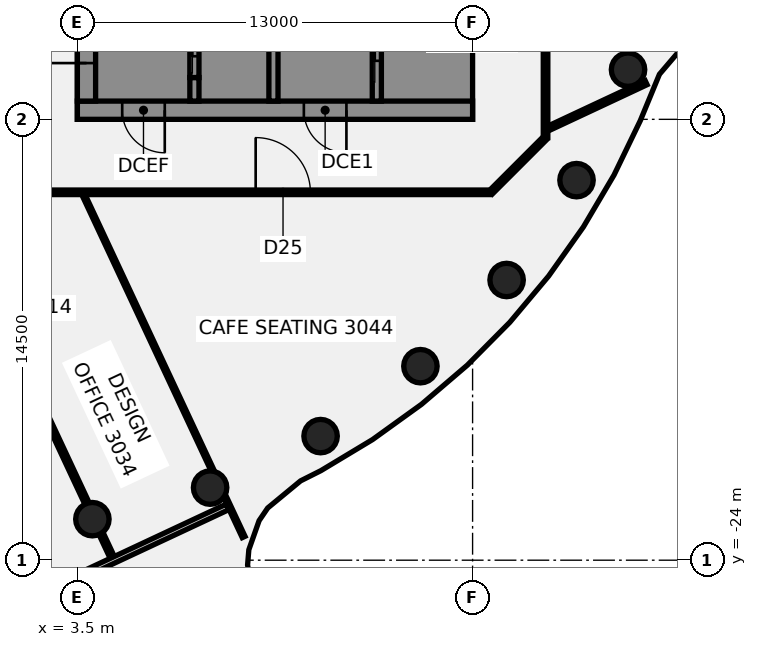
"""IFC4 building model, lengths in metres.
Left out: names, types, materials, properties, quantities, classifications, styles, units other than length and angle.
Written with IfcOpenShell. Run it as: python <this file> out.ifc"""

import sys

from ifc_helpers import new_model, si_unit, direction, frame, frame_2d, origin, origin_2d, place, context, subcontext, project, spatial, polyline, rectangle, circle, outline, extrude, element, fill, save


model = new_model("IFC4")
c1 = context("Model", 3, precision=1e-05, world=origin(), true_north=direction((0.0, 1.0)))
c2 = subcontext(c1, "Body", "Model", "MODEL_VIEW")
j1 = project(units=[si_unit("LENGTHUNIT", "METRE"), si_unit("PLANEANGLEUNIT", "RADIAN")], contexts=[c1])
p1 = place(None, origin())
s1 = spatial("IfcSite", under=j1, at=p1, CompositionType="ELEMENT")
p2 = place(p1, origin())
s2 = spatial("IfcBuilding", under=s1, at=p2, CompositionType="ELEMENT")
p3 = place(p2, frame((0.0, 0.0, 124.75)))
s3 = spatial("IfcBuildingStorey", under=s2, at=p3, CompositionType="ELEMENT", Elevation=124.75)
for number, where, z_axis, x_axis in (
    (1, (3.994, -22.651, -0.14), (0.0, 0.0, 1.0), (1.0, 0.0, 0.0)),
    (2, (7.866, -21.613, -0.14), (0.0, 0.0, 1.0), (1.0, 0.0, 0.0)),
    (3, (11.5, -19.919, -0.14), (0.0, 0.0, 1.0), (1.0, 0.0, 0.0)),
    (4, (14.784, -17.619, -0.14), (0.0, 0.0, 1.0), (1.0, 0.0, 0.0)),
    (5, (17.619, -14.784, -0.14), (0.0, 0.0, 1.0), (1.0, 0.0, 0.0)),
    (6, (19.919, -11.5, -0.14), (0.0, 0.0, 1.0), (1.0, 0.0, 0.0)),
    (7, (21.613, -7.866, -0.14), (0.0, 0.0, 1.0), (1.0, 0.0, 0.0)),
):
    element("IfcColumn", number, at=place(p3, frame(where, z_axis=z_axis, x_axis=x_axis)), inside=s3, PredefinedType="COLUMN", context=c2, shape_type="SweptSolid", body=[
        extrude(circle(Radius=0.55, at=origin_2d()), origin(), (0.0, 0.0, 1.0), 3.71),
    ])
p4 = place(p3, frame((-0.93, -11.99, 0.0), z_axis=(0.0, 0.0, 1.0), x_axis=(0.42379671438, -0.905757332226, 0.0)))
e8 = element("IfcWall", 8, at=p4, inside=s3, PredefinedType="PARTITIONING", context=c2, shape_type="SweptSolid", body=[
    extrude(rectangle(XDim=11.203, YDim=0.15, at=frame_2d((5.602, 0.0))), origin(), (0.0, 0.0, 1.0), 2.97),
])
p5 = place(p4, frame((3.65, 0.0, 0.0)))
e9 = element("IfcOpeningElement", 9, at=p5, cuts=e8, PredefinedType="OPENING", context=c2, shape_type="SweptSolid", body=[
    extrude(rectangle(XDim=0.9, YDim=2.1, at=frame_2d((0.45, 1.05))), frame((0.0, 0.085, 0.0), z_axis=(0.0, -1.0, 0.0), x_axis=(1.0, 0.0, 0.0)), (0.0, 0.0, 1.0), 0.17),
])
p6 = place(p3, frame((4.281, -23.128, 0.0), z_axis=(0.0, 0.0, 1.0), x_axis=(0.423756569473, -0.905776114627, 0.0)))
e10 = element("IfcWall", 10, at=p6, inside=s3, PredefinedType="PARTITIONING", context=c2, shape_type="SweptSolid", body=[
    extrude(rectangle(XDim=0.859, YDim=0.15, at=frame_2d((0.43, 0.0))), origin(), (0.0, 0.0, 1.0), 2.87),
])
p7 = place(p3, frame((3.701, -11.977, 0.0), z_axis=(0.0, 0.0, 1.0), x_axis=(0.423784466957, -0.905763062597, 0.0)))
e11 = element("IfcWall", 11, at=p7, inside=s3, PredefinedType="PARTITIONING", context=c2, shape_type="SweptSolid", body=[
    extrude(rectangle(XDim=10.048, YDim=0.1, at=frame_2d((5.024, 0.0))), origin(), (0.0, 0.0, 1.0), 2.97),
])
p8 = place(p3, frame((8.344, -21.9, 0.0), z_axis=(0.0, 0.0, 1.0), x_axis=(0.423763938656, -0.905772667006, 0.0)))
e12 = element("IfcWall", 12, at=p8, inside=s3, PredefinedType="PARTITIONING", context=c2, shape_type="SweptSolid", body=[
    extrude(rectangle(XDim=1.475, YDim=0.1, at=frame_2d((0.738, 0.0))), origin(), (0.0, 0.0, 1.0), 2.97),
])
p9 = place(p3, frame((-17.1, -11.9, 0.0), z_axis=(0.0, 0.0, 1.0), x_axis=(1.0, 0.0, 0.0)))
e13 = element("IfcWall", 13, at=p9, inside=s3, PredefinedType="PARTITIONING", context=c2, shape_type="SweptSolid", body=[
    extrude(rectangle(XDim=34.165, YDim=0.15, at=frame_2d((17.083, 0.0))), origin(), (0.0, 0.0, 1.0), 2.97),
])
p10 = place(p9, frame((11.47, 0.0, 0.0)))
e14 = element("IfcOpeningElement", 14, at=p10, cuts=e13, PredefinedType="OPENING", context=c2, shape_type="SweptSolid", body=[
    extrude(rectangle(XDim=1.8, YDim=2.1, at=frame_2d((0.9, 1.05))), frame((0.0, 0.085, 0.0), z_axis=(0.0, -1.0, 0.0), x_axis=(1.0, 0.0, 0.0)), (0.0, 0.0, 1.0), 0.17),
])
p11 = place(p9, frame((2.25, 0.0, 0.0)))
e15 = element("IfcOpeningElement", 15, at=p11, cuts=e13, PredefinedType="OPENING", context=c2, shape_type="SweptSolid", body=[
    extrude(rectangle(XDim=1.8, YDim=2.1, at=frame_2d((0.9, 1.05))), frame((0.0, 0.085, 0.0), z_axis=(0.0, -1.0, 0.0), x_axis=(1.0, 0.0, 0.0)), (0.0, 0.0, 1.0), 0.17),
])
p12 = place(p9, frame((26.465, 0.0, 0.0)))
e16 = element("IfcOpeningElement", 16, at=p12, cuts=e13, PredefinedType="OPENING", context=c2, shape_type="SweptSolid", body=[
    extrude(rectangle(XDim=1.8, YDim=2.1, at=frame_2d((0.9, 1.05))), frame((0.0, 0.085, 0.0), z_axis=(0.0, -1.0, 0.0), x_axis=(1.0, 0.0, 0.0)), (0.0, 0.0, 1.0), 0.17),
])
p13 = place(p3, frame((-4.457, -28.281, 0.0), z_axis=(0.0, 0.0, 1.0), x_axis=(0.905756469358, 0.423798558534, 0.0)))
e17 = element("IfcWall", 17, at=p13, inside=s3, PredefinedType="PARTITIONING", context=c2, shape_type="SweptSolid", body=[
    extrude(rectangle(XDim=14.239, YDim=0.2, at=frame_2d((7.12, 0.0))), origin(), (0.0, 0.0, 1.0), 2.87),
])
p14 = place(p13, frame((5.8, 0.0, 0.0)))
e18 = element("IfcOpeningElement", 18, at=p14, cuts=e17, PredefinedType="OPENING", context=c2, shape_type="SweptSolid", body=[
    extrude(rectangle(XDim=1.4, YDim=2.1, at=frame_2d((0.7, 1.05))), frame((0.0, 0.11, 0.0), z_axis=(0.0, -1.0, 0.0), x_axis=(1.0, 0.0, 0.0)), (0.0, 0.0, 1.0), 0.22),
])
p15 = place(p3, frame((18.99, -9.799, 0.0), z_axis=(0.0, 0.0, 1.0), x_axis=(0.905741880745, 0.42382973641, 0.0)))
e19 = element("IfcWall", 19, at=p15, inside=s3, PredefinedType="PARTITIONING", context=c2, shape_type="SweptSolid", body=[
    extrude(rectangle(XDim=3.552, YDim=0.15, at=frame_2d((1.776, 0.0))), origin(), (0.0, 0.0, 1.0), 2.97),
])
p16 = place(p3, frame((17.1, -11.9, 0.0), z_axis=(0.0, 0.0, 1.0), x_axis=(0.707106781187, 0.707106781187, 0.0)))
e20 = element("IfcWall", 20, at=p16, inside=s3, PredefinedType="PARTITIONING", context=c2, shape_type="SweptSolid", body=[
    extrude(rectangle(XDim=2.505, YDim=0.15, at=frame_2d((1.253, 0.0))), origin(), (0.0, 0.0, 1.0), 2.97),
])
p17 = place(p3, frame((18.9, -10.1, 0.0), z_axis=(0.0, 0.0, 1.0), x_axis=(0.0, 1.0, 0.0)))
e21 = element("IfcWall", 21, at=p17, inside=s3, PredefinedType="PARTITIONING", context=c2, shape_type="SweptSolid", body=[
    extrude(rectangle(XDim=20.2, YDim=0.15, at=frame_2d((10.1, 0.0))), origin(), (0.0, 0.0, 1.0), 2.97),
])
p18 = place(p17, frame((8.646, 0.0, 0.0)))
e22 = element("IfcOpeningElement", 22, at=p18, cuts=e21, PredefinedType="OPENING", context=c2, shape_type="SweptSolid", body=[
    extrude(rectangle(XDim=1.8, YDim=2.1, at=frame_2d((0.9, 1.05))), frame((0.0, 0.085, 0.0), z_axis=(0.0, -1.0, 0.0), x_axis=(1.0, 0.0, 0.0)), (0.0, 0.0, 1.0), 0.17),
])
p19 = place(p17, frame((13.453, 0.0, 0.0)))
e23 = element("IfcOpeningElement", 23, at=p19, cuts=e21, PredefinedType="OPENING", context=c2, shape_type="SweptSolid", body=[
    extrude(rectangle(XDim=1.8, YDim=2.1, at=frame_2d((0.9, 1.05))), frame((0.0, 0.085, 0.0), z_axis=(0.0, -1.0, 0.0), x_axis=(1.0, 0.0, 0.0)), (0.0, 0.0, 1.0), 0.17),
])
p20 = place(p3, frame((16.5, -9.2, 0.0), z_axis=(0.0, 0.0, 1.0), x_axis=(-1.0, 0.0, 0.0)))
e24 = element("IfcWall", 24, at=p20, inside=s3, PredefinedType="SHEAR", context=c2, shape_type="SweptSolid", body=[
    extrude(rectangle(XDim=13.0, YDim=0.6, at=frame_2d((6.5, 0.0))), origin(), (0.0, 0.0, 1.0), 3.57),
])
p21 = place(p20, frame((4.15, 0.0, 0.0)))
e25 = element("IfcOpeningElement", 25, at=p21, cuts=e24, PredefinedType="OPENING", context=c2, shape_type="SweptSolid", body=[
    extrude(rectangle(XDim=1.4, YDim=2.1, at=frame_2d((0.7, 1.05))), frame((0.0, 0.31, 0.0), z_axis=(0.0, -1.0, 0.0), x_axis=(1.0, 0.0, 0.0)), (0.0, 0.0, 1.0), 0.62),
])
p22 = place(p20, frame((10.125, 0.0, 0.0)))
e26 = element("IfcOpeningElement", 26, at=p22, cuts=e24, PredefinedType="OPENING", context=c2, shape_type="SweptSolid", body=[
    extrude(rectangle(XDim=1.4, YDim=2.1, at=frame_2d((0.7, 1.05))), frame((0.0, 0.31, 0.0), z_axis=(0.0, -1.0, 0.0), x_axis=(1.0, 0.0, 0.0)), (0.0, 0.0, 1.0), 0.62),
])
p23 = place(p3, origin())
e27 = element("IfcWall", 27, at=p23, inside=s3, PredefinedType="SHEAR", context=c2, shape_type="SweptSolid", body=[
    extrude(outline(polyline([(13.5, -8.9), (15.9, -8.9), (16.5, -8.9), (16.5, 8.9), (15.9, 8.9), (13.5, 8.9), (13.5, 8.125), (15.9, 8.125), (15.9, 5.625), (13.5, 5.625), (13.5, 5.375), (15.9, 5.375), (15.9, 2.875), (13.5, 2.875), (13.5, 2.625), (15.9, 2.625), (15.9, 0.125), (13.5, 0.125), (13.5, -0.125), (15.9, -0.125), (15.9, -2.625), (13.5, -2.625), (13.5, -2.875), (15.9, -2.875), (15.9, -5.375), (13.5, -5.375), (13.5, -5.625), (15.9, -5.625), (15.9, -8.125), (13.5, -8.125), (13.5, -8.9)])), origin(), (0.0, 0.0, 1.0), 3.57),
])
p24 = place(p3, origin())
e28 = element("IfcWall", 28, at=p24, inside=s3, PredefinedType="SHEAR", context=c2, shape_type="SweptSolid", body=[
    extrude(outline(polyline([(7.5, -8.125), (7.5, -8.9), (9.8, -8.9), (9.8, -8.125), (9.8, -5.625), (9.55, -5.625), (9.55, -8.125), (7.5, -8.125)])), origin(), (0.0, 0.0, 1.0), 3.57),
])
p25 = place(p3, frame((7.35, -8.9, 0.0), z_axis=(0.0, 0.0, 1.0), x_axis=(0.0, 1.0, 0.0)))
e29 = element("IfcWall", 29, at=p25, inside=s3, PredefinedType="SHEAR", context=c2, shape_type="SweptSolid", body=[
    extrude(rectangle(XDim=0.775, YDim=0.3, at=frame_2d((0.387, 0.0))), origin(), (0.0, 0.0, 1.0), 3.57),
])
p26 = place(p3, frame((13.35, -8.9, 0.0), z_axis=(0.0, 0.0, 1.0), x_axis=(0.0, 1.0, 0.0)))
e30 = element("IfcWall", 30, at=p26, inside=s3, PredefinedType="SHEAR", context=c2, shape_type="SweptSolid", body=[
    extrude(rectangle(XDim=17.8, YDim=0.3, at=frame_2d((8.9, 0.0))), origin(), (0.0, 0.0, 1.0), 3.57),
])
p27 = place(p26, frame((1.325, 0.0, 0.0)))
e31 = element("IfcOpeningElement", 31, at=p27, cuts=e30, PredefinedType="OPENING", context=c2, shape_type="SweptSolid", body=[
    extrude(rectangle(XDim=1.4, YDim=2.1, at=frame_2d((0.7, 1.05))), frame((0.0, 0.16, 0.0), z_axis=(0.0, -1.0, 0.0), x_axis=(1.0, 0.0, 0.0)), (0.0, 0.0, 1.0), 0.32),
])
p28 = place(p26, frame((4.225, 0.0, 0.0)))
e32 = element("IfcOpeningElement", 32, at=p28, cuts=e30, PredefinedType="OPENING", context=c2, shape_type="SweptSolid", body=[
    extrude(rectangle(XDim=1.1, YDim=2.1, at=frame_2d((0.55, 1.05))), frame((0.0, 0.16, 0.0), z_axis=(0.0, -1.0, 0.0), x_axis=(1.0, 0.0, 0.0)), (0.0, 0.0, 1.0), 0.32),
])
p29 = place(p26, frame((6.975, 0.0, 0.0)))
e33 = element("IfcOpeningElement", 33, at=p29, cuts=e30, PredefinedType="OPENING", context=c2, shape_type="SweptSolid", body=[
    extrude(rectangle(XDim=1.1, YDim=2.1, at=frame_2d((0.55, 1.05))), frame((0.0, 0.16, 0.0), z_axis=(0.0, -1.0, 0.0), x_axis=(1.0, 0.0, 0.0)), (0.0, 0.0, 1.0), 0.32),
])
p30 = place(p26, frame((9.725, 0.0, 0.0)))
e34 = element("IfcOpeningElement", 34, at=p30, cuts=e30, PredefinedType="OPENING", context=c2, shape_type="SweptSolid", body=[
    extrude(rectangle(XDim=1.1, YDim=2.1, at=frame_2d((0.55, 1.05))), frame((0.0, 0.16, 0.0), z_axis=(0.0, -1.0, 0.0), x_axis=(1.0, 0.0, 0.0)), (0.0, 0.0, 1.0), 0.32),
])
p31 = place(p26, frame((12.475, 0.0, 0.0)))
e35 = element("IfcOpeningElement", 35, at=p31, cuts=e30, PredefinedType="OPENING", context=c2, shape_type="SweptSolid", body=[
    extrude(rectangle(XDim=1.1, YDim=2.1, at=frame_2d((0.55, 1.05))), frame((0.0, 0.16, 0.0), z_axis=(0.0, -1.0, 0.0), x_axis=(1.0, 0.0, 0.0)), (0.0, 0.0, 1.0), 0.32),
])
p32 = place(p3, frame((9.95, -8.9, 0.0), z_axis=(0.0, 0.0, 1.0), x_axis=(0.0, 1.0, 0.0)))
e36 = element("IfcWall", 36, at=p32, inside=s3, PredefinedType="SHEAR", context=c2, shape_type="SweptSolid", body=[
    extrude(rectangle(XDim=17.8, YDim=0.3, at=frame_2d((8.9, 0.0))), origin(), (0.0, 0.0, 1.0), 3.57),
])
p33 = place(p3, frame((7.35, -8.125, 0.0), z_axis=(0.0, 0.0, 1.0), x_axis=(0.0, 1.0, 0.0)))
e37 = element("IfcWall", 37, at=p33, inside=s3, PredefinedType="SHEAR", context=c2, shape_type="SweptSolid", body=[
    extrude(rectangle(XDim=2.5, YDim=0.3, at=frame_2d((1.25, 0.0))), origin(), (0.0, 0.0, 1.0), 3.57),
])
p34 = place(p33, frame((0.7, 0.0, 0.0)))
e38 = element("IfcOpeningElement", 38, at=p34, cuts=e37, PredefinedType="OPENING", context=c2, shape_type="SweptSolid", body=[
    extrude(rectangle(XDim=1.1, YDim=2.1, at=frame_2d((0.55, 1.05))), frame((0.0, 0.16, 0.0), z_axis=(0.0, -1.0, 0.0), x_axis=(1.0, 0.0, 0.0)), (0.0, 0.0, 1.0), 0.32),
])
p35 = place(p3, frame((3.8, -8.9, 0.0), z_axis=(0.0, 0.0, 1.0), x_axis=(0.0, 1.0, 0.0)))
e39 = element("IfcWall", 39, at=p35, inside=s3, PredefinedType="SHEAR", context=c2, shape_type="SweptSolid", body=[
    extrude(rectangle(XDim=17.8, YDim=0.6, at=frame_2d((8.9, 0.0))), origin(), (0.0, 0.0, 1.0), 3.57),
])
p36 = place(p35, frame((1.25, 0.0, 0.0)))
e40 = element("IfcOpeningElement", 40, at=p36, cuts=e39, PredefinedType="OPENING", context=c2, shape_type="SweptSolid", body=[
    extrude(rectangle(XDim=1.8, YDim=2.1, at=frame_2d((0.9, 1.05))), frame((0.0, 0.31, 0.0), z_axis=(0.0, -1.0, 0.0), x_axis=(1.0, 0.0, 0.0)), (0.0, 0.0, 1.0), 0.62),
])
p37 = place(p35, frame((12.377, 0.0, 0.0)))
e41 = element("IfcOpeningElement", 41, at=p37, cuts=e39, PredefinedType="OPENING", context=c2, shape_type="SweptSolid", body=[
    extrude(rectangle(XDim=1.0, YDim=2.1, at=frame_2d((0.5, 1.05))), frame((0.0, 0.31, 0.0), z_axis=(0.0, -1.0, 0.0), x_axis=(1.0, 0.0, 0.0)), (0.0, 0.0, 1.0), 0.62),
])
p38 = place(p35, frame((15.903, 0.0, 0.0)))
e42 = element("IfcOpeningElement", 42, at=p38, cuts=e39, PredefinedType="OPENING", context=c2, shape_type="SweptSolid", body=[
    extrude(rectangle(XDim=1.0, YDim=2.1, at=frame_2d((0.5, 1.05))), frame((0.0, 0.31, 0.0), z_axis=(0.0, -1.0, 0.0), x_axis=(1.0, 0.0, 0.0)), (0.0, 0.0, 1.0), 0.62),
])
p39 = place(p12, frame((1.8, 0.0, 0.0), z_axis=(0.0, 0.0, 1.0), x_axis=(-1.0, 0.0, 0.0)))
e43 = element("IfcDoor", 43, at=p39, inside=s3, OperationType="DOUBLE_DOOR_SINGLE_SWING", PredefinedType="DOOR", context=c2, shape_type="SweptSolid", body=[
    extrude(rectangle(XDim=1.8, YDim=2.1, at=frame_2d((0.9, 1.05))), frame((0.0, 0.025, 0.0), z_axis=(0.0, -1.0, 0.0), x_axis=(1.0, 0.0, 0.0)), (0.0, 0.0, 1.0), 0.05),
])
fill(e16, e43)
p40 = place(p21, origin())
e44 = element("IfcDoor", 44, at=p40, inside=s3, OperationType="SINGLE_SWING_LEFT", PredefinedType="DOOR", context=c2, shape_type="SweptSolid", body=[
    extrude(rectangle(XDim=1.4, YDim=2.1, at=frame_2d((0.7, 1.05))), frame((0.0, 0.025, 0.0), z_axis=(0.0, -1.0, 0.0), x_axis=(1.0, 0.0, 0.0)), (0.0, 0.0, 1.0), 0.05),
])
fill(e25, e44)
p41 = place(p22, origin())
e45 = element("IfcDoor", 45, at=p41, inside=s3, OperationType="SINGLE_SWING_LEFT", PredefinedType="DOOR", context=c2, shape_type="SweptSolid", body=[
    extrude(rectangle(XDim=1.4, YDim=2.1, at=frame_2d((0.7, 1.05))), frame((0.0, 0.025, 0.0), z_axis=(0.0, -1.0, 0.0), x_axis=(1.0, 0.0, 0.0)), (0.0, 0.0, 1.0), 0.05),
])
fill(e26, e45)
p42 = place(p36, origin())
e46 = element("IfcDoor", 46, at=p42, inside=s3, OperationType="SINGLE_SWING_LEFT", PredefinedType="DOOR", context=c2, shape_type="SweptSolid", body=[
    extrude(rectangle(XDim=1.8, YDim=2.1, at=frame_2d((0.9, 1.05))), frame((0.0, 0.025, 0.0), z_axis=(0.0, -1.0, 0.0), x_axis=(1.0, 0.0, 0.0)), (0.0, 0.0, 1.0), 0.05),
])
fill(e40, e46)
p43 = place(p27, origin())
e47 = element("IfcDoor", 47, at=p43, inside=s3, OperationType="SLIDING_TO_LEFT", PredefinedType="DOOR", context=c2, shape_type="SweptSolid", body=[
    extrude(rectangle(XDim=1.4, YDim=2.1, at=frame_2d((0.7, 1.05))), frame((0.0, 0.025, 0.0), z_axis=(0.0, -1.0, 0.0), x_axis=(1.0, 0.0, 0.0)), (0.0, 0.0, 1.0), 0.05),
])
fill(e31, e47)
p44 = place(p34, origin())
e48 = element("IfcDoor", 48, at=p44, inside=s3, OperationType="SLIDING_TO_LEFT", PredefinedType="DOOR", context=c2, shape_type="SweptSolid", body=[
    extrude(rectangle(XDim=1.1, YDim=2.1, at=frame_2d((0.55, 1.05))), frame((0.0, 0.025, 0.0), z_axis=(0.0, -1.0, 0.0), x_axis=(1.0, 0.0, 0.0)), (0.0, 0.0, 1.0), 0.05),
])
fill(e38, e48)
save(model, sys.argv[1])
